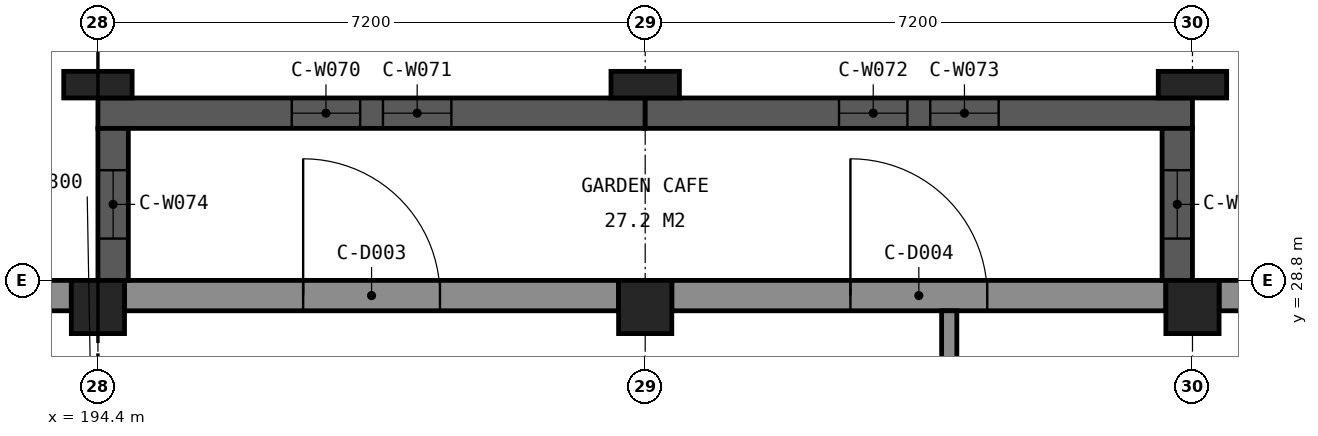
"""IFC4 building model, lengths in metres.
Left out: names, types, materials, properties, quantities, classifications, styles, units other than length and angle.
Written with IfcOpenShell. Run it as: python <this file> out.ifc"""

import sys

from ifc_helpers import new_model, si_unit, direction, frame, frame_2d, origin, origin_2d, place, context, subcontext, project, spatial, rectangle, extrude, element, fill, save


model = new_model("IFC4")
c1 = context("Model", 3, precision=1e-05, world=origin(), true_north=direction((0.0, 1.0)))
c2 = subcontext(c1, "Body", "Model", "MODEL_VIEW")
j1 = project(units=[si_unit("LENGTHUNIT", "METRE"), si_unit("PLANEANGLEUNIT", "RADIAN")], contexts=[c1])
p1 = place(None, origin())
s1 = spatial("IfcSite", under=j1, at=p1, CompositionType="ELEMENT")
p2 = place(p1, origin())
s2 = spatial("IfcBuilding", under=s1, at=p2, CompositionType="ELEMENT")
p3 = place(p2, frame((0.0, 0.0, 4.8)))
s3 = spatial("IfcBuildingStorey", under=s2, at=p3, CompositionType="ELEMENT", Elevation=4.8)
for number, where, z_axis, x_axis in (
    (1, (194.4, 28.45, 0.0), (0.0, 0.0, 1.0), (1.0, 0.0, 0.0)),
    (2, (201.6, 28.45, 0.0), (0.0, 0.0, 1.0), (1.0, 0.0, 0.0)),
    (3, (208.8, 28.45, 0.0), (0.0, 0.0, 1.0), (1.0, 0.0, 0.0)),
):
    element("IfcColumn", number, at=place(p3, frame(where, z_axis=z_axis, x_axis=x_axis)), inside=s3, PredefinedType="COLUMN", context=c2, shape_type="SweptSolid", body=[
        extrude(rectangle(XDim=0.7, YDim=0.7, at=origin_2d()), origin(), (0.0, 0.0, 1.0), 4.8),
    ])
p4 = place(p3, frame((187.55, 28.6, 0.0), z_axis=(0.0, 0.0, 1.0), x_axis=(1.0, 0.0, 0.0)))
e4 = element("IfcWall", 4, at=p4, inside=s3, PredefinedType="SOLIDWALL", context=c2, shape_type="SweptSolid", body=[
    extrude(rectangle(XDim=6.5, YDim=0.4, at=frame_2d((3.25, 0.0))), origin(), (0.0, 0.0, 1.0), 3.95),
])
p5 = place(p4, frame((2.2, 0.0, 1.0)))
e5 = element("IfcOpeningElement", 5, at=p5, cuts=e4, PredefinedType="OPENING", context=c2, shape_type="SweptSolid", body=[
    extrude(rectangle(XDim=0.9, YDim=2.1, at=frame_2d((0.45, 1.05))), frame((0.0, 0.21, 0.0), z_axis=(0.0, -1.0, 0.0), x_axis=(1.0, 0.0, 0.0)), (0.0, 0.0, 1.0), 0.42),
])
p6 = place(p4, frame((3.4, 0.0, 1.0)))
e6 = element("IfcOpeningElement", 6, at=p6, cuts=e4, PredefinedType="OPENING", context=c2, shape_type="SweptSolid", body=[
    extrude(rectangle(XDim=0.9, YDim=2.1, at=frame_2d((0.45, 1.05))), frame((0.0, 0.21, 0.0), z_axis=(0.0, -1.0, 0.0), x_axis=(1.0, 0.0, 0.0)), (0.0, 0.0, 1.0), 0.42),
])
p7 = place(p3, frame((194.75, 28.6, 0.0), z_axis=(0.0, 0.0, 1.0), x_axis=(1.0, 0.0, 0.0)))
e7 = element("IfcWall", 7, at=p7, inside=s3, PredefinedType="SOLIDWALL", context=c2, shape_type="SweptSolid", body=[
    extrude(rectangle(XDim=6.5, YDim=0.4, at=frame_2d((3.25, 0.0))), origin(), (0.0, 0.0, 1.0), 3.95),
])
p8 = place(p7, frame((2.35, 0.0, 0.0)))
e8 = element("IfcOpeningElement", 8, at=p8, cuts=e7, PredefinedType="OPENING", context=c2, shape_type="SweptSolid", body=[
    extrude(rectangle(XDim=1.8, YDim=2.1, at=frame_2d((0.9, 1.05))), frame((0.0, 0.21, 0.0), z_axis=(0.0, -1.0, 0.0), x_axis=(1.0, 0.0, 0.0)), (0.0, 0.0, 1.0), 0.42),
])
p9 = place(p3, frame((201.95, 28.6, 0.0), z_axis=(0.0, 0.0, 1.0), x_axis=(1.0, 0.0, 0.0)))
e9 = element("IfcWall", 9, at=p9, inside=s3, PredefinedType="SOLIDWALL", context=c2, shape_type="SweptSolid", body=[
    extrude(rectangle(XDim=6.5, YDim=0.4, at=frame_2d((3.25, 0.0))), origin(), (0.0, 0.0, 1.0), 3.95),
])
p10 = place(p9, frame((2.35, 0.0, 0.0)))
e10 = element("IfcOpeningElement", 10, at=p10, cuts=e9, PredefinedType="OPENING", context=c2, shape_type="SweptSolid", body=[
    extrude(rectangle(XDim=1.8, YDim=2.1, at=frame_2d((0.9, 1.05))), frame((0.0, 0.21, 0.0), z_axis=(0.0, -1.0, 0.0), x_axis=(1.0, 0.0, 0.0)), (0.0, 0.0, 1.0), 0.42),
])
p11 = place(p3, frame((209.15, 28.6, 0.0), z_axis=(0.0, 0.0, 1.0), x_axis=(1.0, 0.0, 0.0)))
e11 = element("IfcWall", 11, at=p11, inside=s3, PredefinedType="SOLIDWALL", context=c2, shape_type="SweptSolid", body=[
    extrude(rectangle(XDim=6.5, YDim=0.4, at=frame_2d((3.25, 0.0))), origin(), (0.0, 0.0, 1.0), 3.95),
])
p12 = place(p11, frame((2.05, 0.0, 0.0)))
e12 = element("IfcOpeningElement", 12, at=p12, cuts=e11, PredefinedType="OPENING", context=c2, shape_type="SweptSolid", body=[
    extrude(rectangle(XDim=2.4, YDim=2.7, at=frame_2d((1.2, 1.35))), frame((0.0, 0.21, 0.0), z_axis=(0.0, -1.0, 0.0), x_axis=(1.0, 0.0, 0.0)), (0.0, 0.0, 1.0), 0.42),
])
p13 = place(p3, frame((194.4, 31.0, 0.0), z_axis=(0.0, 0.0, 1.0), x_axis=(1.0, 0.0, 0.0)))
e13 = element("IfcWall", 13, at=p13, inside=s3, PredefinedType="SOLIDWALL", context=c2, shape_type="SweptSolid", body=[
    extrude(rectangle(XDim=7.2, YDim=0.4, at=frame_2d((3.6, 0.0))), origin(), (0.0, 0.0, 1.0), 4.55),
])
p14 = place(p13, frame((2.55, 0.0, 1.0)))
e14 = element("IfcOpeningElement", 14, at=p14, cuts=e13, PredefinedType="OPENING", context=c2, shape_type="SweptSolid", body=[
    extrude(rectangle(XDim=0.9, YDim=2.1, at=frame_2d((0.45, 1.05))), frame((0.0, 0.21, 0.0), z_axis=(0.0, -1.0, 0.0), x_axis=(1.0, 0.0, 0.0)), (0.0, 0.0, 1.0), 0.42),
])
p15 = place(p13, frame((3.75, 0.0, 1.0)))
e15 = element("IfcOpeningElement", 15, at=p15, cuts=e13, PredefinedType="OPENING", context=c2, shape_type="SweptSolid", body=[
    extrude(rectangle(XDim=0.9, YDim=2.1, at=frame_2d((0.45, 1.05))), frame((0.0, 0.21, 0.0), z_axis=(0.0, -1.0, 0.0), x_axis=(1.0, 0.0, 0.0)), (0.0, 0.0, 1.0), 0.42),
])
p16 = place(p3, frame((201.6, 31.0, 0.0), z_axis=(0.0, 0.0, 1.0), x_axis=(1.0, 0.0, 0.0)))
e16 = element("IfcWall", 16, at=p16, inside=s3, PredefinedType="SOLIDWALL", context=c2, shape_type="SweptSolid", body=[
    extrude(rectangle(XDim=7.2, YDim=0.4, at=frame_2d((3.6, 0.0))), origin(), (0.0, 0.0, 1.0), 4.55),
])
p17 = place(p16, frame((2.55, 0.0, 1.0)))
e17 = element("IfcOpeningElement", 17, at=p17, cuts=e16, PredefinedType="OPENING", context=c2, shape_type="SweptSolid", body=[
    extrude(rectangle(XDim=0.9, YDim=2.1, at=frame_2d((0.45, 1.05))), frame((0.0, 0.21, 0.0), z_axis=(0.0, -1.0, 0.0), x_axis=(1.0, 0.0, 0.0)), (0.0, 0.0, 1.0), 0.42),
])
p18 = place(p16, frame((3.75, 0.0, 1.0)))
e18 = element("IfcOpeningElement", 18, at=p18, cuts=e16, PredefinedType="OPENING", context=c2, shape_type="SweptSolid", body=[
    extrude(rectangle(XDim=0.9, YDim=2.1, at=frame_2d((0.45, 1.05))), frame((0.0, 0.21, 0.0), z_axis=(0.0, -1.0, 0.0), x_axis=(1.0, 0.0, 0.0)), (0.0, 0.0, 1.0), 0.42),
])
p19 = place(p3, frame((194.6, 28.8, 0.0), z_axis=(0.0, 0.0, 1.0), x_axis=(0.0, 1.0, 0.0)))
e19 = element("IfcWall", 19, at=p19, inside=s3, PredefinedType="SOLIDWALL", context=c2, shape_type="SweptSolid", body=[
    extrude(rectangle(XDim=2.0, YDim=0.4, at=frame_2d((1.0, 0.0))), origin(), (0.0, 0.0, 1.0), 4.55),
])
p20 = place(p19, frame((0.55, 0.0, 1.0)))
e20 = element("IfcOpeningElement", 20, at=p20, cuts=e19, PredefinedType="OPENING", context=c2, shape_type="SweptSolid", body=[
    extrude(rectangle(XDim=0.9, YDim=2.1, at=frame_2d((0.45, 1.05))), frame((0.0, 0.21, 0.0), z_axis=(0.0, -1.0, 0.0), x_axis=(1.0, 0.0, 0.0)), (0.0, 0.0, 1.0), 0.42),
])
p21 = place(p3, frame((208.6, 30.8, 0.0), z_axis=(0.0, 0.0, 1.0), x_axis=(0.0, -1.0, 0.0)))
e21 = element("IfcWall", 21, at=p21, inside=s3, PredefinedType="SOLIDWALL", context=c2, shape_type="SweptSolid", body=[
    extrude(rectangle(XDim=2.0, YDim=0.4, at=frame_2d((1.0, 0.0))), origin(), (0.0, 0.0, 1.0), 4.55),
])
p22 = place(p21, frame((0.55, 0.0, 1.0)))
e22 = element("IfcOpeningElement", 22, at=p22, cuts=e21, PredefinedType="OPENING", context=c2, shape_type="SweptSolid", body=[
    extrude(rectangle(XDim=0.9, YDim=2.1, at=frame_2d((0.45, 1.05))), frame((0.0, 0.21, 0.0), z_axis=(0.0, -1.0, 0.0), x_axis=(1.0, 0.0, 0.0)), (0.0, 0.0, 1.0), 0.42),
])
for number, where, z_axis, x_axis in (
    (23, (194.4, 31.375, 0.0), (0.0, 0.0, 1.0), (1.0, 0.0, 0.0)),
    (24, (201.6, 31.375, 0.0), (0.0, 0.0, 1.0), (1.0, 0.0, 0.0)),
    (25, (208.8, 31.375, 0.0), (0.0, 0.0, 1.0), (1.0, 0.0, 0.0)),
):
    element("IfcColumn", number, at=place(p3, frame(where, z_axis=z_axis, x_axis=x_axis)), inside=s3, PredefinedType="PILASTER", context=c2, shape_type="SweptSolid", body=[
        extrude(rectangle(XDim=0.9, YDim=0.35, at=origin_2d()), origin(), (0.0, 0.0, 1.0), 4.8),
    ])
p23 = place(p3, frame((205.6, 28.4, 0.0), z_axis=(0.0, 0.0, 1.0), x_axis=(0.0, -1.0, 0.0)))
e26 = element("IfcWall", 26, at=p23, inside=s3, PredefinedType="PARTITIONING", context=c2, shape_type="SweptSolid", body=[
    extrude(rectangle(XDim=9.7, YDim=0.2, at=frame_2d((4.85, 0.0))), origin(), (0.0, 0.0, 1.0), 3.95),
])
p24 = place(p8, origin())
e27 = element("IfcDoor", 27, at=p24, inside=s3, OperationType="NOTDEFINED", PredefinedType="DOOR", context=c2, shape_type="SweptSolid", body=[
    extrude(rectangle(XDim=1.8, YDim=2.1, at=frame_2d((0.9, 1.05))), frame((0.0, 0.025, 0.0), z_axis=(0.0, -1.0, 0.0), x_axis=(1.0, 0.0, 0.0)), (0.0, 0.0, 1.0), 0.05),
])
fill(e8, e27)
p25 = place(p10, origin())
e28 = element("IfcDoor", 28, at=p25, inside=s3, OperationType="NOTDEFINED", PredefinedType="DOOR", context=c2, shape_type="SweptSolid", body=[
    extrude(rectangle(XDim=1.8, YDim=2.1, at=frame_2d((0.9, 1.05))), frame((0.0, 0.025, 0.0), z_axis=(0.0, -1.0, 0.0), x_axis=(1.0, 0.0, 0.0)), (0.0, 0.0, 1.0), 0.05),
])
fill(e10, e28)
p26 = place(p14, origin())
e29 = element("IfcWindow", 29, at=p26, inside=s3, PartitioningType="SINGLE_PANEL", PredefinedType="WINDOW", context=c2, shape_type="SweptSolid", body=[
    extrude(rectangle(XDim=0.9, YDim=2.1, at=frame_2d((0.45, 1.05))), frame((0.0, -0.09, 0.0), z_axis=(0.0, -1.0, 0.0), x_axis=(1.0, 0.0, 0.0)), (0.0, 0.0, 1.0), 0.06),
])
fill(e14, e29)
p27 = place(p15, origin())
e30 = element("IfcWindow", 30, at=p27, inside=s3, PartitioningType="SINGLE_PANEL", PredefinedType="WINDOW", context=c2, shape_type="SweptSolid", body=[
    extrude(rectangle(XDim=0.9, YDim=2.1, at=frame_2d((0.45, 1.05))), frame((0.0, -0.09, 0.0), z_axis=(0.0, -1.0, 0.0), x_axis=(1.0, 0.0, 0.0)), (0.0, 0.0, 1.0), 0.06),
])
fill(e15, e30)
p28 = place(p17, origin())
e31 = element("IfcWindow", 31, at=p28, inside=s3, PartitioningType="SINGLE_PANEL", PredefinedType="WINDOW", context=c2, shape_type="SweptSolid", body=[
    extrude(rectangle(XDim=0.9, YDim=2.1, at=frame_2d((0.45, 1.05))), frame((0.0, -0.09, 0.0), z_axis=(0.0, -1.0, 0.0), x_axis=(1.0, 0.0, 0.0)), (0.0, 0.0, 1.0), 0.06),
])
fill(e17, e31)
p29 = place(p18, origin())
e32 = element("IfcWindow", 32, at=p29, inside=s3, PartitioningType="SINGLE_PANEL", PredefinedType="WINDOW", context=c2, shape_type="SweptSolid", body=[
    extrude(rectangle(XDim=0.9, YDim=2.1, at=frame_2d((0.45, 1.05))), frame((0.0, -0.09, 0.0), z_axis=(0.0, -1.0, 0.0), x_axis=(1.0, 0.0, 0.0)), (0.0, 0.0, 1.0), 0.06),
])
fill(e18, e32)
p30 = place(p20, origin())
e33 = element("IfcWindow", 33, at=p30, inside=s3, PartitioningType="SINGLE_PANEL", PredefinedType="WINDOW", context=c2, shape_type="SweptSolid", body=[
    extrude(rectangle(XDim=0.9, YDim=2.1, at=frame_2d((0.45, 1.05))), frame((0.0, -0.09, 0.0), z_axis=(0.0, -1.0, 0.0), x_axis=(1.0, 0.0, 0.0)), (0.0, 0.0, 1.0), 0.06),
])
fill(e20, e33)
p31 = place(p22, origin())
e34 = element("IfcWindow", 34, at=p31, inside=s3, PartitioningType="SINGLE_PANEL", PredefinedType="WINDOW", context=c2, shape_type="SweptSolid", body=[
    extrude(rectangle(XDim=0.9, YDim=2.1, at=frame_2d((0.45, 1.05))), frame((0.0, -0.09, 0.0), z_axis=(0.0, -1.0, 0.0), x_axis=(1.0, 0.0, 0.0)), (0.0, 0.0, 1.0), 0.06),
])
fill(e22, e34)
save(model, sys.argv[1])
